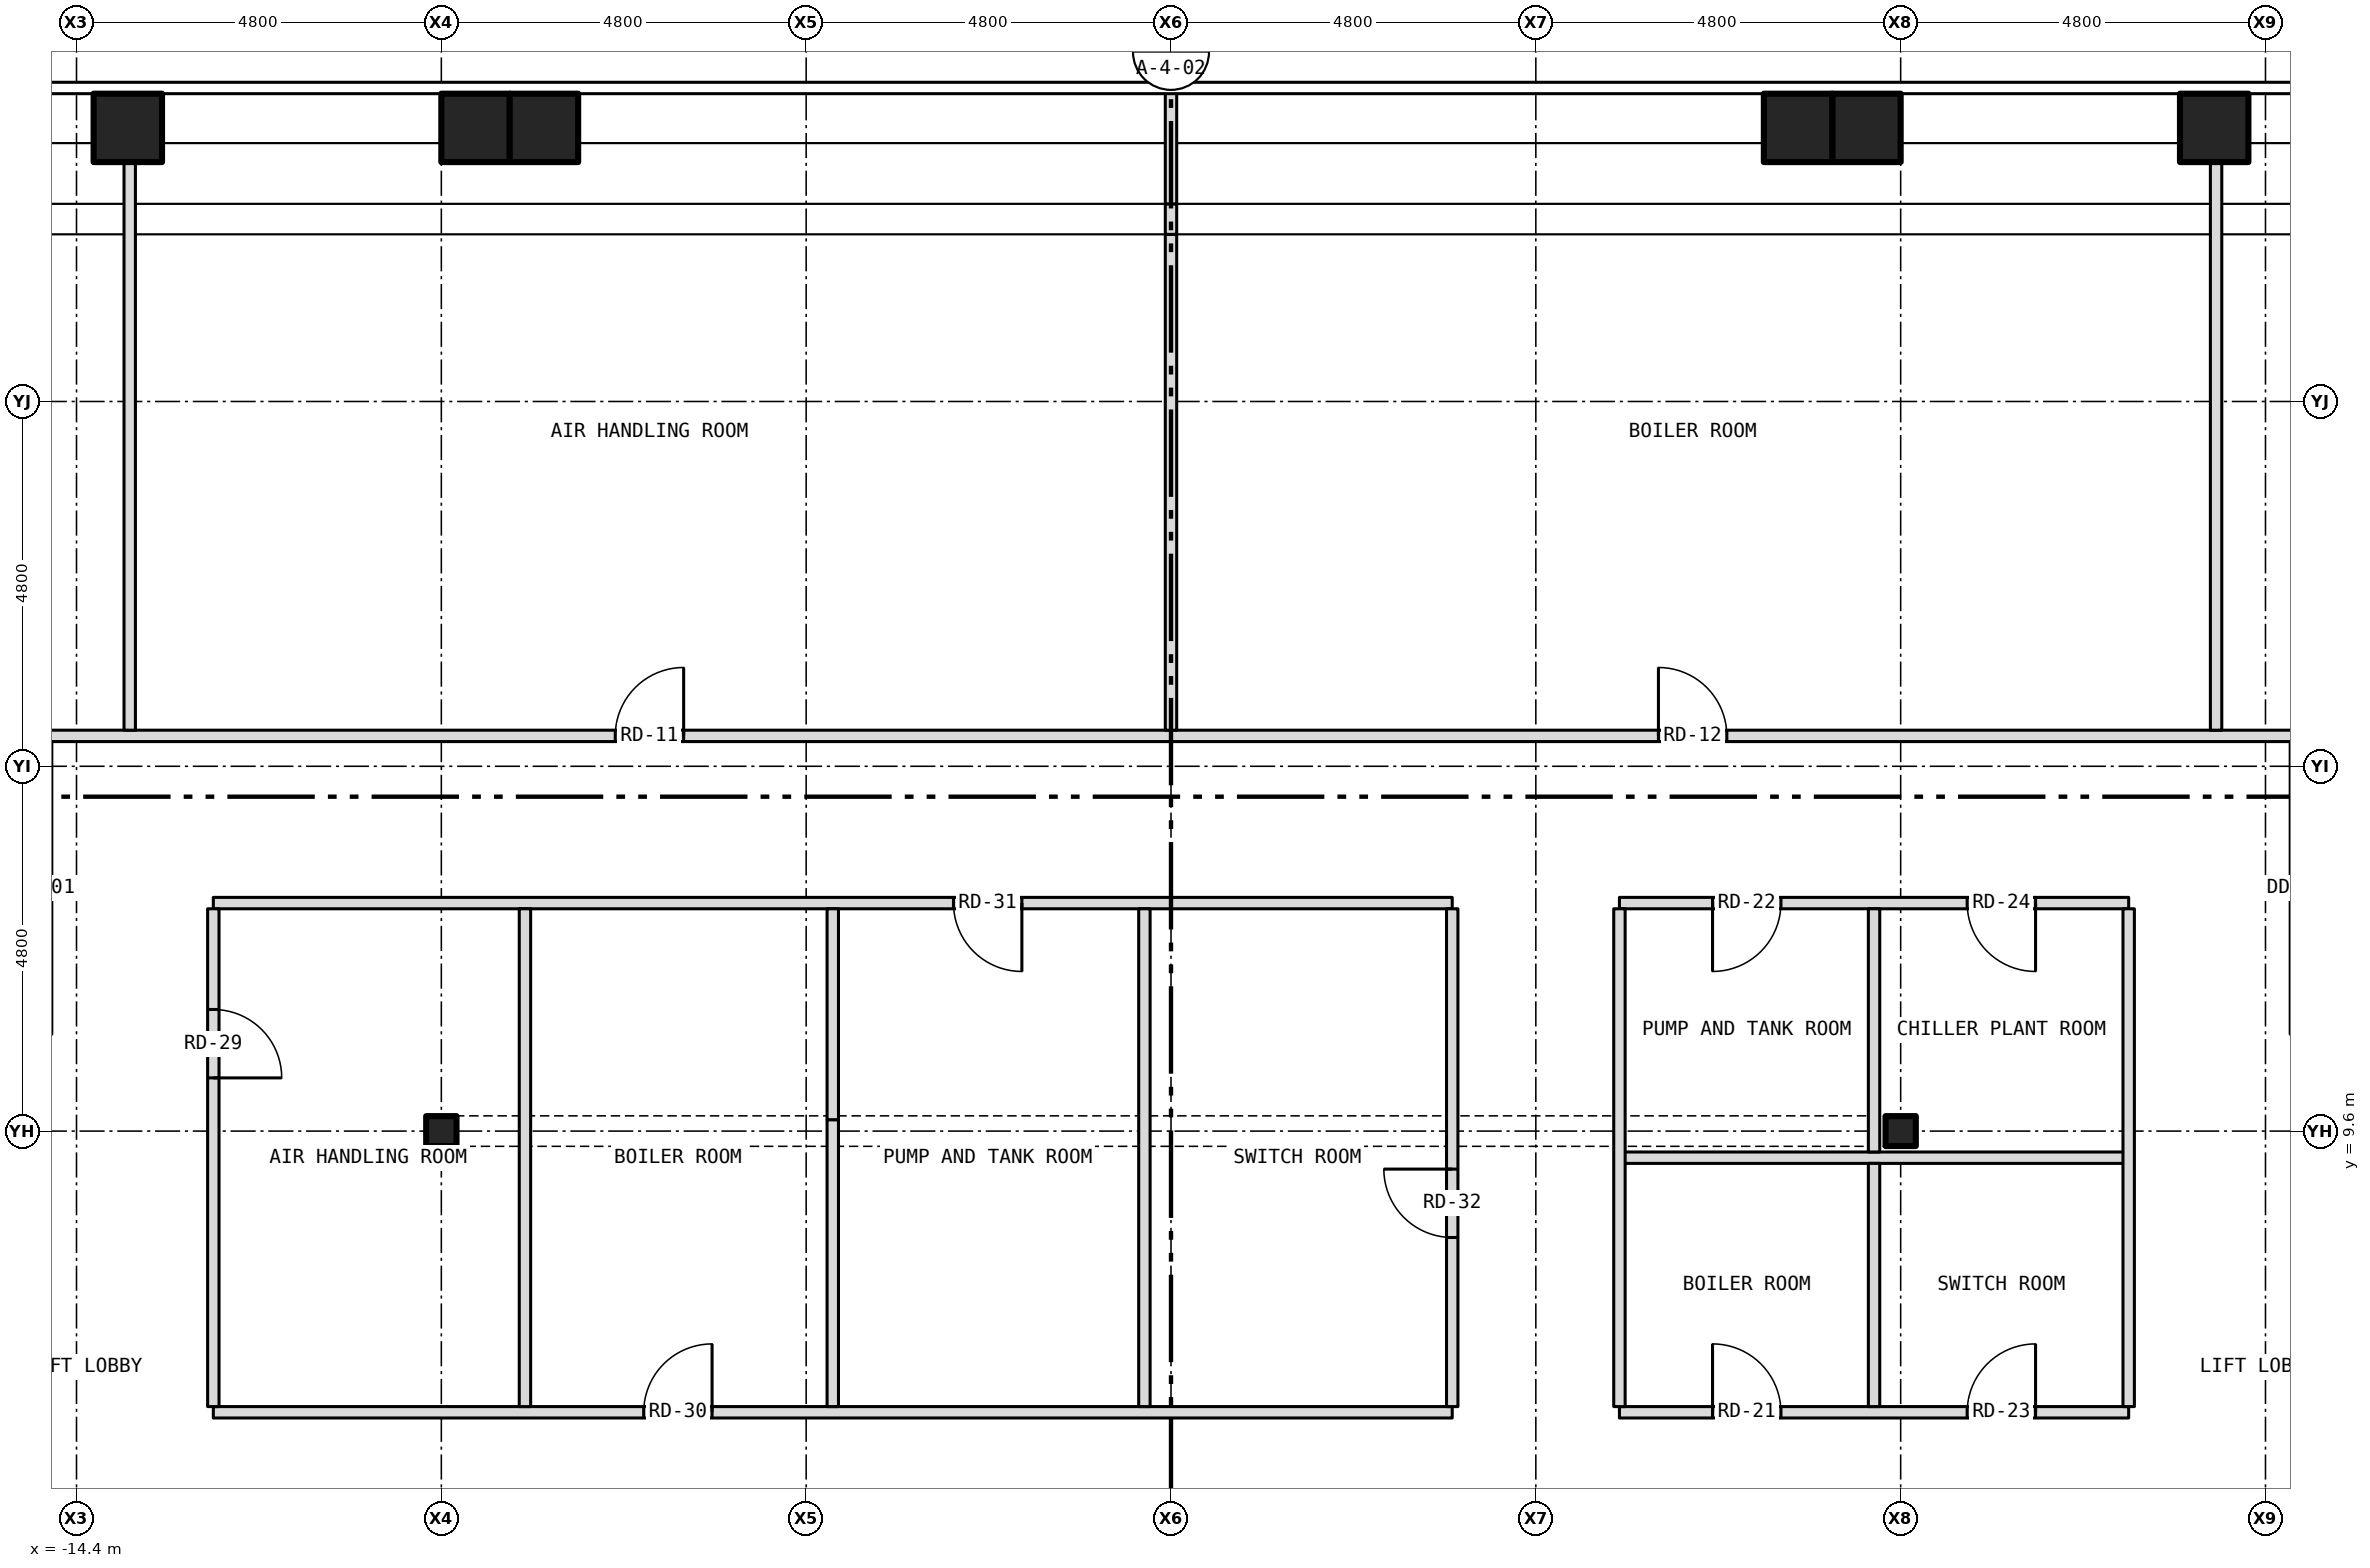
"""IFC4 building model, lengths in metres.
Left out: names, types, materials, properties, quantities, classifications, styles, units other than length and angle.
Written with IfcOpenShell. Run it as: python <this file> out.ifc"""

import sys

from ifc_helpers import new_model, si_unit, direction, frame, frame_2d, origin, origin_2d, place, context, subcontext, project, spatial, rectangle, hollow_rectangle, i_section, extrude, element, fill, save


model = new_model("IFC4")
c1 = context("Model", 3, precision=1e-05, world=origin(), true_north=direction((0.0, 1.0)))
c2 = subcontext(c1, "Body", "Model", "MODEL_VIEW")
j1 = project(units=[si_unit("LENGTHUNIT", "METRE"), si_unit("PLANEANGLEUNIT", "RADIAN")], contexts=[c1])
p1 = place(None, origin())
s1 = spatial("IfcSite", under=j1, at=p1, CompositionType="ELEMENT")
p2 = place(p1, origin())
s2 = spatial("IfcBuilding", under=s1, at=p2, CompositionType="ELEMENT")
p3 = place(p2, frame((0.0, 0.0, 138.0)))
s3 = spatial("IfcBuildingStorey", under=s2, at=p3, CompositionType="ELEMENT", Elevation=138.0)
for number, where, z_axis, x_axis in (
    (1, (-13.725, 22.8, -0.3), (0.0, 0.0, 1.0), (1.0, 0.0, 0.0)),
    (2, (-9.15, 22.8, -0.3), (0.0, 0.0, 1.0), (1.0, 0.0, 0.0)),
    (3, (9.15, 22.8, -0.3), (0.0, 0.0, 1.0), (1.0, 0.0, 0.0)),
    (4, (13.725, 22.8, -0.3), (0.0, 0.0, 1.0), (1.0, 0.0, 0.0)),
    (5, (-8.25, 22.8, -0.3), (0.0, 0.0, 1.0), (1.0, 0.0, 0.0)),
    (6, (8.25, 22.8, -0.3), (0.0, 0.0, 1.0), (1.0, 0.0, 0.0)),
):
    element("IfcColumn", number, at=place(p3, frame(where, z_axis=z_axis, x_axis=x_axis)), inside=s3, PredefinedType="COLUMN", context=c2, shape_type="SweptSolid", body=[
        extrude(hollow_rectangle(XDim=0.9, YDim=0.9, WallThickness=0.05, at=origin_2d()), origin(), (0.0, 0.0, 1.0), 4.6),
    ])
for number, where, z_axis, x_axis in (
    (7, (-9.6, 9.6, -0.3), (0.0, 0.0, 1.0), (1.0, 0.0, 0.0)),
    (8, (9.6, 9.6, -0.3), (0.0, 0.0, 1.0), (1.0, 0.0, 0.0)),
):
    element("IfcColumn", number, at=place(p3, frame(where, z_axis=z_axis, x_axis=x_axis)), inside=s3, PredefinedType="COLUMN", context=c2, shape_type="SweptSolid", body=[
        extrude(i_section(OverallWidth=0.399, OverallDepth=0.394, WebThickness=0.023, FlangeThickness=0.037, at=origin_2d()), origin(), (0.0, 0.0, 1.0), 4.6),
    ])
p4 = place(p3, frame((-12.6, 5.9, 0.0), z_axis=(0.0, 0.0, 1.0), x_axis=(1.0, 0.0, 0.0)))
e9 = element("IfcWall", 9, at=p4, inside=s3, PredefinedType="PARTITIONING", context=c2, shape_type="SweptSolid", body=[
    extrude(rectangle(XDim=16.3, YDim=0.15, at=frame_2d((8.15, 0.0))), origin(), (0.0, 0.0, 1.0), 4.3),
])
p5 = place(p4, frame((5.662, 0.0, 0.0)))
e10 = element("IfcOpeningElement", 10, at=p5, cuts=e9, PredefinedType="OPENING", context=c2, shape_type="SweptSolid", body=[
    extrude(rectangle(XDim=0.9, YDim=2.1, at=frame_2d((0.45, 1.05))), frame((0.0, 0.087, 0.0), z_axis=(0.0, -1.0, 0.0), x_axis=(1.0, 0.0, 0.0)), (0.0, 0.0, 1.0), 0.174),
])
p6 = place(p3, frame((5.9, 5.9, 0.0), z_axis=(0.0, 0.0, 1.0), x_axis=(1.0, 0.0, 0.0)))
e11 = element("IfcWall", 11, at=p6, inside=s3, PredefinedType="PARTITIONING", context=c2, shape_type="SweptSolid", body=[
    extrude(rectangle(XDim=6.7, YDim=0.15, at=frame_2d((3.35, 0.0))), origin(), (0.0, 0.0, 1.0), 4.3),
])
p7 = place(p6, frame((1.225, 0.0, 0.0)))
e12 = element("IfcOpeningElement", 12, at=p7, cuts=e11, PredefinedType="OPENING", context=c2, shape_type="SweptSolid", body=[
    extrude(rectangle(XDim=0.9, YDim=2.1, at=frame_2d((0.45, 1.05))), frame((0.0, 0.087, 0.0), z_axis=(0.0, -1.0, 0.0), x_axis=(1.0, 0.0, 0.0)), (0.0, 0.0, 1.0), 0.174),
])
p8 = place(p6, frame((4.575, 0.0, 0.0)))
e13 = element("IfcOpeningElement", 13, at=p8, cuts=e11, PredefinedType="OPENING", context=c2, shape_type="SweptSolid", body=[
    extrude(rectangle(XDim=0.9, YDim=2.1, at=frame_2d((0.45, 1.05))), frame((0.0, 0.087, 0.0), z_axis=(0.0, -1.0, 0.0), x_axis=(1.0, 0.0, 0.0)), (0.0, 0.0, 1.0), 0.174),
])
p9 = place(p3, frame((5.9, 9.25, 0.0), z_axis=(0.0, 0.0, 1.0), x_axis=(1.0, 0.0, 0.0)))
e14 = element("IfcWall", 14, at=p9, inside=s3, PredefinedType="PARTITIONING", context=c2, shape_type="SweptSolid", body=[
    extrude(rectangle(XDim=6.7, YDim=0.15, at=frame_2d((3.35, 0.0))), origin(), (0.0, 0.0, 1.0), 4.3),
])
p10 = place(p3, frame((-12.6, 12.6, 0.0), z_axis=(0.0, 0.0, 1.0), x_axis=(1.0, 0.0, 0.0)))
e15 = element("IfcWall", 15, at=p10, inside=s3, PredefinedType="PARTITIONING", context=c2, shape_type="SweptSolid", body=[
    extrude(rectangle(XDim=16.3, YDim=0.15, at=frame_2d((8.15, 0.0))), origin(), (0.0, 0.0, 1.0), 4.3),
])
p11 = place(p10, frame((9.738, 0.0, 0.0)))
e16 = element("IfcOpeningElement", 16, at=p11, cuts=e15, PredefinedType="OPENING", context=c2, shape_type="SweptSolid", body=[
    extrude(rectangle(XDim=0.9, YDim=2.1, at=frame_2d((0.45, 1.05))), frame((0.0, 0.087, 0.0), z_axis=(0.0, -1.0, 0.0), x_axis=(1.0, 0.0, 0.0)), (0.0, 0.0, 1.0), 0.174),
])
p12 = place(p3, frame((5.9, 12.6, 0.0), z_axis=(0.0, 0.0, 1.0), x_axis=(1.0, 0.0, 0.0)))
e17 = element("IfcWall", 17, at=p12, inside=s3, PredefinedType="PARTITIONING", context=c2, shape_type="SweptSolid", body=[
    extrude(rectangle(XDim=6.7, YDim=0.15, at=frame_2d((3.35, 0.0))), origin(), (0.0, 0.0, 1.0), 4.3),
])
p13 = place(p12, frame((1.225, 0.0, 0.0)))
e18 = element("IfcOpeningElement", 18, at=p13, cuts=e17, PredefinedType="OPENING", context=c2, shape_type="SweptSolid", body=[
    extrude(rectangle(XDim=0.9, YDim=2.1, at=frame_2d((0.45, 1.05))), frame((0.0, 0.087, 0.0), z_axis=(0.0, -1.0, 0.0), x_axis=(1.0, 0.0, 0.0)), (0.0, 0.0, 1.0), 0.174),
])
p14 = place(p12, frame((4.575, 0.0, 0.0)))
e19 = element("IfcOpeningElement", 19, at=p14, cuts=e17, PredefinedType="OPENING", context=c2, shape_type="SweptSolid", body=[
    extrude(rectangle(XDim=0.9, YDim=2.1, at=frame_2d((0.45, 1.05))), frame((0.0, 0.087, 0.0), z_axis=(0.0, -1.0, 0.0), x_axis=(1.0, 0.0, 0.0)), (0.0, 0.0, 1.0), 0.174),
])
p15 = place(p3, frame((-14.8, 14.8, 0.0), z_axis=(0.0, 0.0, 1.0), x_axis=(1.0, 0.0, 0.0)))
e20 = element("IfcWall", 20, at=p15, inside=s3, PredefinedType="PARTITIONING", context=c2, shape_type="SweptSolid", body=[
    extrude(rectangle(XDim=29.6, YDim=0.15, at=frame_2d((14.8, 0.0))), origin(), (0.0, 0.0, 1.0), 4.3),
])
p16 = place(p15, frame((7.488, 0.0, 0.0)))
e21 = element("IfcOpeningElement", 21, at=p16, cuts=e20, PredefinedType="OPENING", context=c2, shape_type="SweptSolid", body=[
    extrude(rectangle(XDim=0.9, YDim=2.1, at=frame_2d((0.45, 1.05))), frame((0.0, 0.087, 0.0), z_axis=(0.0, -1.0, 0.0), x_axis=(1.0, 0.0, 0.0)), (0.0, 0.0, 1.0), 0.174),
])
p17 = place(p15, frame((21.213, 0.0, 0.0)))
e22 = element("IfcOpeningElement", 22, at=p17, cuts=e20, PredefinedType="OPENING", context=c2, shape_type="SweptSolid", body=[
    extrude(rectangle(XDim=0.9, YDim=2.1, at=frame_2d((0.45, 1.05))), frame((0.0, 0.087, 0.0), z_axis=(0.0, -1.0, 0.0), x_axis=(1.0, 0.0, 0.0)), (0.0, 0.0, 1.0), 0.174),
])
p18 = place(p3, frame((-13.7, 14.875, 0.0), z_axis=(0.0, 0.0, 1.0), x_axis=(0.0, 1.0, 0.0)))
e23 = element("IfcWall", 23, at=p18, inside=s3, PredefinedType="PARTITIONING", context=c2, shape_type="SweptSolid", body=[
    extrude(rectangle(XDim=7.805, YDim=0.15, at=frame_2d((3.902, 0.0))), origin(), (0.0, 0.0, 1.0), 4.3),
])
p19 = place(p3, frame((-12.6, 5.975, 0.0), z_axis=(0.0, 0.0, 1.0), x_axis=(0.0, 1.0, 0.0)))
e24 = element("IfcWall", 24, at=p19, inside=s3, PredefinedType="PARTITIONING", context=c2, shape_type="SweptSolid", body=[
    extrude(rectangle(XDim=6.55, YDim=0.15, at=frame_2d((3.275, 0.0))), origin(), (0.0, 0.0, 1.0), 4.3),
])
p20 = place(p19, frame((4.325, 0.0, 0.0)))
e25 = element("IfcOpeningElement", 25, at=p20, cuts=e24, PredefinedType="OPENING", context=c2, shape_type="SweptSolid", body=[
    extrude(rectangle(XDim=0.9, YDim=2.1, at=frame_2d((0.45, 1.05))), frame((0.0, 0.087, 0.0), z_axis=(0.0, -1.0, 0.0), x_axis=(1.0, 0.0, 0.0)), (0.0, 0.0, 1.0), 0.174),
])
p21 = place(p3, frame((-8.5, 5.975, 0.0), z_axis=(0.0, 0.0, 1.0), x_axis=(0.0, 1.0, 0.0)))
e26 = element("IfcWall", 26, at=p21, inside=s3, PredefinedType="PARTITIONING", context=c2, shape_type="SweptSolid", body=[
    extrude(rectangle(XDim=6.55, YDim=0.15, at=frame_2d((3.275, 0.0))), origin(), (0.0, 0.0, 1.0), 4.3),
])
p22 = place(p3, frame((-4.45, 5.975, 0.0), z_axis=(0.0, 0.0, 1.0), x_axis=(0.0, 1.0, 0.0)))
e27 = element("IfcWall", 27, at=p22, inside=s3, PredefinedType="PARTITIONING", context=c2, shape_type="SweptSolid", body=[
    extrude(rectangle(XDim=3.775, YDim=0.15, at=frame_2d((1.887, 0.0))), origin(), (0.0, 0.0, 1.0), 4.3),
])
p23 = place(p3, frame((-4.45, 9.75, 0.0), z_axis=(0.0, 0.0, 1.0), x_axis=(0.0, 1.0, 0.0)))
e28 = element("IfcWall", 28, at=p23, inside=s3, PredefinedType="PARTITIONING", context=c2, shape_type="SweptSolid", body=[
    extrude(rectangle(XDim=2.775, YDim=0.15, at=frame_2d((1.387, 0.0))), origin(), (0.0, 0.0, 1.0), 3.1),
])
p24 = place(p3, frame((-0.35, 5.975, 0.0), z_axis=(0.0, 0.0, 1.0), x_axis=(0.0, 1.0, 0.0)))
e29 = element("IfcWall", 29, at=p24, inside=s3, PredefinedType="PARTITIONING", context=c2, shape_type="SweptSolid", body=[
    extrude(rectangle(XDim=6.55, YDim=0.15, at=frame_2d((3.275, 0.0))), origin(), (0.0, 0.0, 1.0), 4.3),
])
p25 = place(p3, frame((0.0, 14.875, 0.0), z_axis=(0.0, 0.0, 1.0), x_axis=(0.0, 1.0, 0.0)))
e30 = element("IfcWall", 30, at=p25, inside=s3, PredefinedType="PARTITIONING", context=c2, shape_type="SweptSolid", body=[
    extrude(rectangle(XDim=6.524, YDim=0.15, at=frame_2d((3.262, 0.0))), origin(), (0.0, 0.0, 1.0), 3.1),
])
p26 = place(p3, frame((0.0, 21.399, 0.0), z_axis=(0.0, 0.0, 1.0), x_axis=(0.0, 1.0, 0.0)))
e31 = element("IfcWall", 31, at=p26, inside=s3, PredefinedType="PARTITIONING", context=c2, shape_type="SweptSolid", body=[
    extrude(rectangle(XDim=0.401, YDim=0.15, at=frame_2d((0.201, 0.0))), origin(), (0.0, 0.0, 1.0), 4.3),
])
p27 = place(p3, frame((0.0, 21.801, 0.0), z_axis=(0.0, 0.0, 1.0), x_axis=(0.0, 1.0, 0.0)))
e32 = element("IfcWall", 32, at=p27, inside=s3, PredefinedType="PARTITIONING", context=c2, shape_type="SweptSolid", body=[
    extrude(rectangle(XDim=1.479, YDim=0.15, at=frame_2d((0.74, 0.0))), origin(), (0.0, 0.0, 1.0), 3.1),
])
p28 = place(p3, frame((3.7, 5.975, 0.0), z_axis=(0.0, 0.0, 1.0), x_axis=(0.0, 1.0, 0.0)))
e33 = element("IfcWall", 33, at=p28, inside=s3, PredefinedType="PARTITIONING", context=c2, shape_type="SweptSolid", body=[
    extrude(rectangle(XDim=6.55, YDim=0.15, at=frame_2d((3.275, 0.0))), origin(), (0.0, 0.0, 1.0), 4.3),
])
p29 = place(p28, frame((2.225, 0.0, 0.0)))
e34 = element("IfcOpeningElement", 34, at=p29, cuts=e33, PredefinedType="OPENING", context=c2, shape_type="SweptSolid", body=[
    extrude(rectangle(XDim=0.9, YDim=2.1, at=frame_2d((0.45, 1.05))), frame((0.0, 0.087, 0.0), z_axis=(0.0, -1.0, 0.0), x_axis=(1.0, 0.0, 0.0)), (0.0, 0.0, 1.0), 0.174),
])
p30 = place(p3, frame((5.9, 5.975, 0.0), z_axis=(0.0, 0.0, 1.0), x_axis=(0.0, 1.0, 0.0)))
e35 = element("IfcWall", 35, at=p30, inside=s3, PredefinedType="PARTITIONING", context=c2, shape_type="SweptSolid", body=[
    extrude(rectangle(XDim=6.55, YDim=0.15, at=frame_2d((3.275, 0.0))), origin(), (0.0, 0.0, 1.0), 4.3),
])
for number, where, z_axis, x_axis in (
    (36, (9.25, 5.975, 0.0), (0.0, 0.0, 1.0), (0.0, 1.0, 0.0)),
    (37, (9.25, 9.325, 0.0), (0.0, 0.0, 1.0), (0.0, 1.0, 0.0)),
):
    element("IfcWall", number, at=place(p3, frame(where, z_axis=z_axis, x_axis=x_axis)), inside=s3, PredefinedType="PARTITIONING", context=c2, shape_type="SweptSolid", body=[
        extrude(rectangle(XDim=3.2, YDim=0.15, at=frame_2d((1.6, 0.0))), origin(), (0.0, 0.0, 1.0), 4.3),
    ])
p31 = place(p3, frame((12.6, 5.975, 0.0), z_axis=(0.0, 0.0, 1.0), x_axis=(0.0, 1.0, 0.0)))
e38 = element("IfcWall", 38, at=p31, inside=s3, PredefinedType="PARTITIONING", context=c2, shape_type="SweptSolid", body=[
    extrude(rectangle(XDim=6.55, YDim=0.15, at=frame_2d((3.275, 0.0))), origin(), (0.0, 0.0, 1.0), 4.3),
])
p32 = place(p3, frame((13.75, 14.875, 0.0), z_axis=(0.0, 0.0, 1.0), x_axis=(0.0, 1.0, 0.0)))
e39 = element("IfcWall", 39, at=p32, inside=s3, PredefinedType="PARTITIONING", context=c2, shape_type="SweptSolid", body=[
    extrude(rectangle(XDim=7.805, YDim=0.15, at=frame_2d((3.902, 0.0))), origin(), (0.0, 0.0, 1.0), 4.3),
])
p33 = place(p16, origin())
e40 = element("IfcDoor", 40, at=p33, inside=s3, OperationType="SINGLE_SWING_RIGHT", PredefinedType="DOOR", context=c2, shape_type="SweptSolid", body=[
    extrude(rectangle(XDim=0.9, YDim=2.1, at=frame_2d((0.45, 1.05))), frame((0.0, 0.025, 0.0), z_axis=(0.0, -1.0, 0.0), x_axis=(1.0, 0.0, 0.0)), (0.0, 0.0, 1.0), 0.05),
])
fill(e21, e40)
p34 = place(p17, origin())
e41 = element("IfcDoor", 41, at=p34, inside=s3, OperationType="SINGLE_SWING_LEFT", PredefinedType="DOOR", context=c2, shape_type="SweptSolid", body=[
    extrude(rectangle(XDim=0.9, YDim=2.1, at=frame_2d((0.45, 1.05))), frame((0.0, 0.025, 0.0), z_axis=(0.0, -1.0, 0.0), x_axis=(1.0, 0.0, 0.0)), (0.0, 0.0, 1.0), 0.05),
])
fill(e22, e41)
p35 = place(p7, origin())
e42 = element("IfcDoor", 42, at=p35, inside=s3, OperationType="SINGLE_SWING_LEFT", PredefinedType="DOOR", context=c2, shape_type="SweptSolid", body=[
    extrude(rectangle(XDim=0.9, YDim=2.1, at=frame_2d((0.45, 1.05))), frame((0.0, 0.025, 0.0), z_axis=(0.0, -1.0, 0.0), x_axis=(1.0, 0.0, 0.0)), (0.0, 0.0, 1.0), 0.05),
])
fill(e12, e42)
p36 = place(p13, origin())
e43 = element("IfcDoor", 43, at=p36, inside=s3, OperationType="SINGLE_SWING_LEFT", PredefinedType="DOOR", context=c2, shape_type="SweptSolid", body=[
    extrude(rectangle(XDim=0.9, YDim=2.1, at=frame_2d((0.45, 1.05))), frame((0.0, 0.025, 0.0), z_axis=(0.0, -1.0, 0.0), x_axis=(1.0, 0.0, 0.0)), (0.0, 0.0, 1.0), 0.05),
])
fill(e18, e43)
p37 = place(p8, origin())
e44 = element("IfcDoor", 44, at=p37, inside=s3, OperationType="SINGLE_SWING_RIGHT", PredefinedType="DOOR", context=c2, shape_type="SweptSolid", body=[
    extrude(rectangle(XDim=0.9, YDim=2.1, at=frame_2d((0.45, 1.05))), frame((0.0, 0.025, 0.0), z_axis=(0.0, -1.0, 0.0), x_axis=(1.0, 0.0, 0.0)), (0.0, 0.0, 1.0), 0.05),
])
fill(e13, e44)
p38 = place(p14, origin())
e45 = element("IfcDoor", 45, at=p38, inside=s3, OperationType="SINGLE_SWING_RIGHT", PredefinedType="DOOR", context=c2, shape_type="SweptSolid", body=[
    extrude(rectangle(XDim=0.9, YDim=2.1, at=frame_2d((0.45, 1.05))), frame((0.0, 0.025, 0.0), z_axis=(0.0, -1.0, 0.0), x_axis=(1.0, 0.0, 0.0)), (0.0, 0.0, 1.0), 0.05),
])
fill(e19, e45)
p39 = place(p20, origin())
e46 = element("IfcDoor", 46, at=p39, inside=s3, OperationType="SINGLE_SWING_LEFT", PredefinedType="DOOR", context=c2, shape_type="SweptSolid", body=[
    extrude(rectangle(XDim=0.9, YDim=2.1, at=frame_2d((0.45, 1.05))), frame((0.0, 0.025, 0.0), z_axis=(0.0, -1.0, 0.0), x_axis=(1.0, 0.0, 0.0)), (0.0, 0.0, 1.0), 0.05),
])
fill(e25, e46)
p40 = place(p5, origin())
e47 = element("IfcDoor", 47, at=p40, inside=s3, OperationType="SINGLE_SWING_RIGHT", PredefinedType="DOOR", context=c2, shape_type="SweptSolid", body=[
    extrude(rectangle(XDim=0.9, YDim=2.1, at=frame_2d((0.45, 1.05))), frame((0.0, 0.025, 0.0), z_axis=(0.0, -1.0, 0.0), x_axis=(1.0, 0.0, 0.0)), (0.0, 0.0, 1.0), 0.05),
])
fill(e10, e47)
p41 = place(p11, origin())
e48 = element("IfcDoor", 48, at=p41, inside=s3, OperationType="SINGLE_SWING_RIGHT", PredefinedType="DOOR", context=c2, shape_type="SweptSolid", body=[
    extrude(rectangle(XDim=0.9, YDim=2.1, at=frame_2d((0.45, 1.05))), frame((0.0, 0.025, 0.0), z_axis=(0.0, -1.0, 0.0), x_axis=(1.0, 0.0, 0.0)), (0.0, 0.0, 1.0), 0.05),
])
fill(e16, e48)
p42 = place(p29, origin())
e49 = element("IfcDoor", 49, at=p42, inside=s3, OperationType="SINGLE_SWING_RIGHT", PredefinedType="DOOR", context=c2, shape_type="SweptSolid", body=[
    extrude(rectangle(XDim=0.9, YDim=2.1, at=frame_2d((0.45, 1.05))), frame((0.0, 0.025, 0.0), z_axis=(0.0, -1.0, 0.0), x_axis=(1.0, 0.0, 0.0)), (0.0, 0.0, 1.0), 0.05),
])
fill(e34, e49)
save(model, sys.argv[1])
